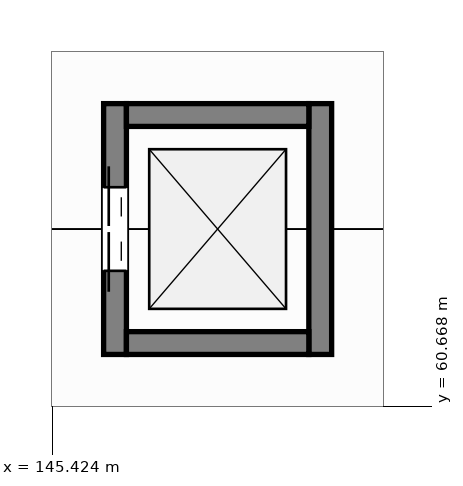
"""IFC4 building model, lengths in metres.
Left out: names, types, materials, properties, quantities, classifications, styles, units other than length and angle.
Written with IfcOpenShell. Run it as: python <this file> out.ifc"""

import sys

from ifc_helpers import new_model, si_unit, direction, frame, frame_2d, origin, place, context, subcontext, project, spatial, rectangle, extrude, element, fill, save


model = new_model("IFC4")
c1 = context("Model", 3, precision=1e-05, world=origin(), true_north=direction((0.0, 1.0)))
c2 = subcontext(c1, "Body", "Model", "MODEL_VIEW")
j1 = project(units=[si_unit("LENGTHUNIT", "METRE"), si_unit("PLANEANGLEUNIT", "RADIAN")], contexts=[c1])
p1 = place(None, origin())
s1 = spatial("IfcSite", under=j1, at=p1, CompositionType="ELEMENT")
p2 = place(p1, origin())
s2 = spatial("IfcBuilding", under=s1, at=p2, CompositionType="ELEMENT")
p3 = place(p2, origin())
s3 = spatial("IfcBuildingStorey", under=s2, at=p3, CompositionType="ELEMENT", Elevation=0.0)
p4 = place(p3, frame((146.25, 61.35, 0.0), z_axis=(0.0, 0.0, 1.0), x_axis=(0.0, 1.0, 0.0)))
e1 = element("IfcWall", 1, at=p4, inside=s3, PredefinedType="SHEAR", context=c2, shape_type="SweptSolid", body=[
    extrude(rectangle(XDim=3.3, YDim=0.3, at=frame_2d((1.65, 0.0))), origin(), (0.0, 0.0, 1.0), 4.58),
])
p5 = place(p4, frame((1.1, 0.0, 0.0)))
e2 = element("IfcOpeningElement", 2, at=p5, cuts=e1, PredefinedType="OPENING", context=c2, shape_type="SweptSolid", body=[
    extrude(rectangle(XDim=1.1, YDim=2.15, at=frame_2d((0.55, 1.075))), frame((0.0, 0.16, 0.0), z_axis=(0.0, -1.0, 0.0), x_axis=(1.0, 0.0, 0.0)), (0.0, 0.0, 1.0), 0.32),
])
p6 = place(p3, frame((148.95, 61.35, 0.0), z_axis=(0.0, 0.0, 1.0), x_axis=(0.0, 1.0, 0.0)))
e3 = element("IfcWall", 3, at=p6, inside=s3, PredefinedType="SHEAR", context=c2, shape_type="SweptSolid", body=[
    extrude(rectangle(XDim=3.3, YDim=0.3, at=frame_2d((1.65, 0.0))), origin(), (0.0, 0.0, 1.0), 4.58),
])
for number, where, z_axis, x_axis in (
    (4, (146.4, 64.5, 0.0), (0.0, 0.0, 1.0), (1.0, 0.0, 0.0)),
    (5, (146.4, 61.5, 0.0), (0.0, 0.0, 1.0), (1.0, 0.0, 0.0)),
):
    element("IfcWall", number, at=place(p3, frame(where, z_axis=z_axis, x_axis=x_axis)), inside=s3, PredefinedType="SHEAR", context=c2, shape_type="SweptSolid", body=[
        extrude(rectangle(XDim=2.4, YDim=0.3, at=frame_2d((1.2, 0.0))), origin(), (0.0, 0.0, 1.0), 4.58),
    ])
p7 = place(p5, origin())
e6 = element("IfcDoor", 6, at=p7, inside=s3, OperationType="DOUBLE_DOOR_SLIDING", PredefinedType="DOOR", context=c2, shape_type="SweptSolid", body=[
    extrude(rectangle(XDim=1.1, YDim=2.15, at=frame_2d((0.55, 1.075))), frame((0.0, 0.025, 0.0), z_axis=(0.0, -1.0, 0.0), x_axis=(1.0, 0.0, 0.0)), (0.0, 0.0, 1.0), 0.05),
])
fill(e2, e6)
save(model, sys.argv[1])
